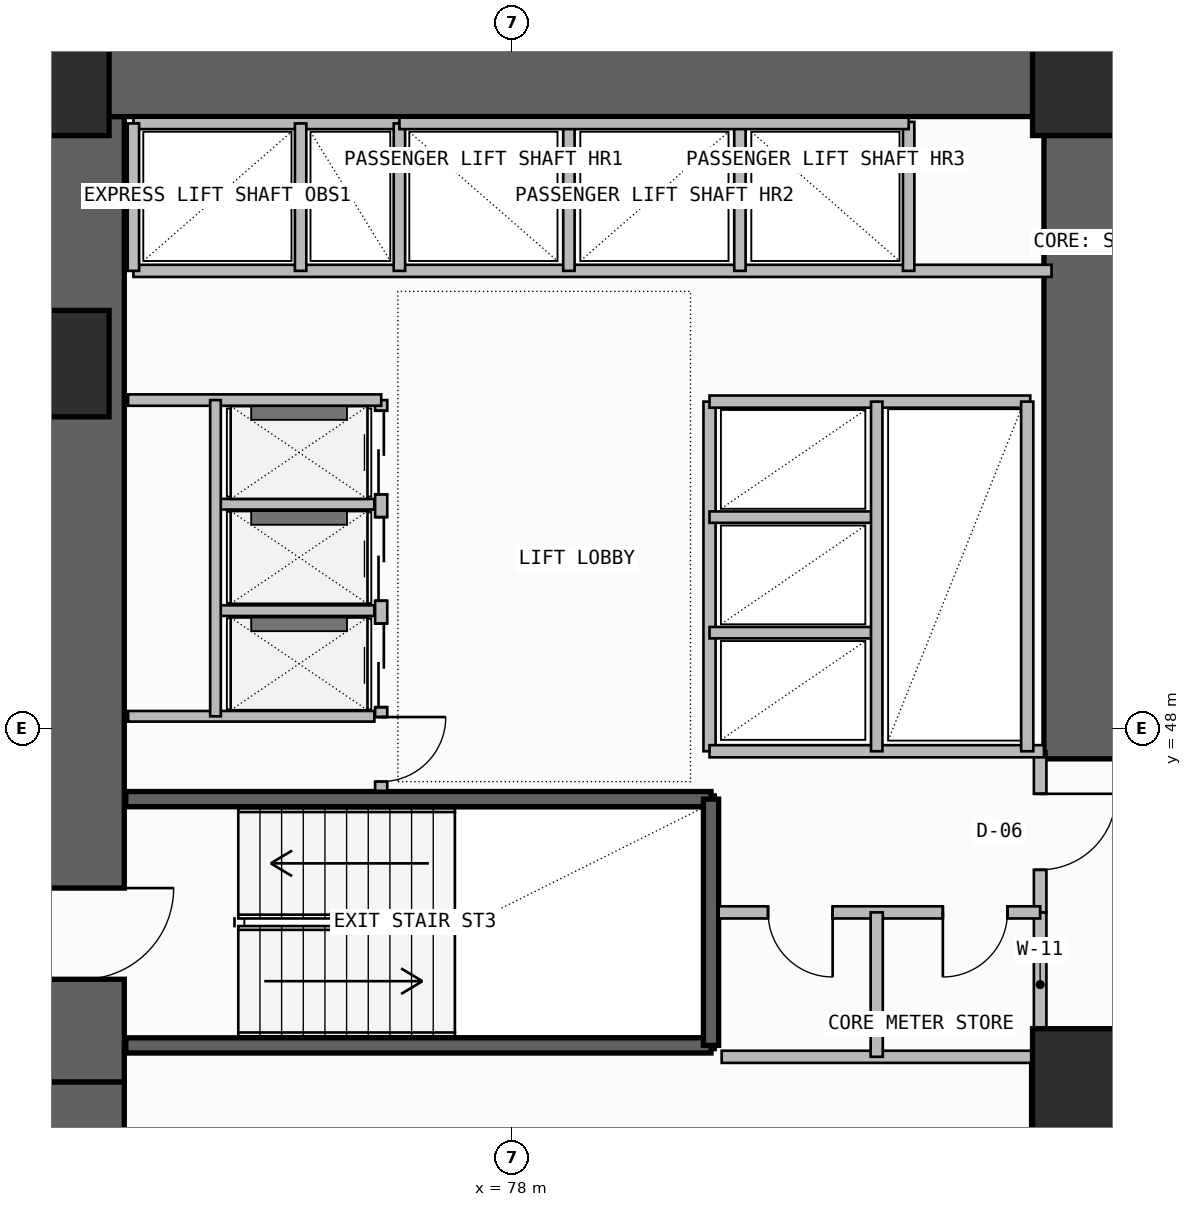
"""IFC4 building model, lengths in metres.
Left out: names, types, materials, properties, quantities, classifications, styles, units other than length and angle.
Written with IfcOpenShell. Run it as: python <this file> out.ifc"""

import sys

from ifc_helpers import new_model, si_unit, direction, frame, frame_2d, origin, origin_2d, place, context, subcontext, project, spatial, rectangle, extrude, element, fill, save


model = new_model("IFC4")
c1 = context("Model", 3, precision=1e-05, world=origin(), true_north=direction((0.0, 1.0)))
c2 = subcontext(c1, "Body", "Model", "MODEL_VIEW")
j1 = project(units=[si_unit("LENGTHUNIT", "METRE"), si_unit("PLANEANGLEUNIT", "RADIAN")], contexts=[c1])
p1 = place(None, origin())
s1 = spatial("IfcSite", under=j1, at=p1, CompositionType="ELEMENT")
p2 = place(p1, origin())
s2 = spatial("IfcBuilding", under=s1, at=p2, CompositionType="ELEMENT")
p3 = place(p2, frame((0.0, 0.0, 77.7)))
s3 = spatial("IfcBuildingStorey", under=s2, at=p3, CompositionType="ELEMENT", Elevation=77.7)
p4 = place(p3, frame((72.35, 35.5, -0.26), z_axis=(0.0, 0.0, 1.0), x_axis=(0.0, 1.0, 0.0)))
e1 = element("IfcWall", 1, at=p4, inside=s3, PredefinedType="SHEAR", context=c2, shape_type="SweptSolid", body=[
    extrude(rectangle(XDim=7.85, YDim=1.1, at=frame_2d((3.925, 0.0))), origin(), (0.0, 0.0, 1.0), 3.6),
])
p5 = place(p4, frame((1.45, 0.0, 0.26)))
e2 = element("IfcOpeningElement", 2, at=p5, cuts=e1, PredefinedType="OPENING", context=c2, shape_type="SweptSolid", body=[
    extrude(rectangle(XDim=1.2, YDim=2.2, at=frame_2d((0.6, 1.1))), frame((0.0, 0.56, 0.0), z_axis=(0.0, -1.0, 0.0), x_axis=(1.0, 0.0, 0.0)), (0.0, 0.0, 1.0), 1.12),
])
p6 = place(p3, frame((72.35, 43.35, -0.26), z_axis=(0.0, 0.0, 1.0), x_axis=(0.0, 1.0, 0.0)))
e3 = element("IfcWall", 3, at=p6, inside=s3, PredefinedType="SHEAR", context=c2, shape_type="SweptSolid", body=[
    extrude(rectangle(XDim=12.7, YDim=1.1, at=frame_2d((6.35, 0.0))), origin(), (0.0, 0.0, 1.0), 3.6),
])
p7 = place(p6, frame((1.35, 0.0, 0.26)))
e4 = element("IfcOpeningElement", 4, at=p7, cuts=e3, PredefinedType="OPENING", context=c2, shape_type="SweptSolid", body=[
    extrude(rectangle(XDim=1.2, YDim=2.2, at=frame_2d((0.6, 1.1))), frame((0.0, 0.56, 0.0), z_axis=(0.0, -1.0, 0.0), x_axis=(1.0, 0.0, 0.0)), (0.0, 0.0, 1.0), 1.12),
])
p8 = place(p3, frame((71.8, 56.6, -0.26), z_axis=(0.0, 0.0, 1.0), x_axis=(1.0, 0.0, 0.0)))
e5 = element("IfcWall", 5, at=p8, inside=s3, PredefinedType="SHEAR", context=c2, shape_type="SweptSolid", body=[
    extrude(rectangle(XDim=14.3, YDim=1.1, at=frame_2d((7.15, 0.0))), origin(), (0.0, 0.0, 1.0), 3.6),
])
p9 = place(p3, frame((85.55, 47.6, -0.26), z_axis=(0.0, 0.0, 1.0), x_axis=(0.0, 1.0, 0.0)))
e6 = element("IfcWall", 6, at=p9, inside=s3, PredefinedType="SHEAR", context=c2, shape_type="SweptSolid", body=[
    extrude(rectangle(XDim=8.45, YDim=1.1, at=frame_2d((4.225, 0.0))), origin(), (0.0, 0.0, 1.0), 3.6),
])
for number, where, z_axis, x_axis in (
    (7, (85.55, 43.35, 0.0), (0.0, 0.0, 1.0), (1.0, 0.0, 0.0)),
    (8, (72.0, 52.8, 0.0), (0.0, 0.0, 1.0), (1.0, 0.0, 0.0)),
    (9, (72.0, 56.5, 0.0), (0.0, 0.0, 1.0), (1.0, 0.0, 0.0)),
    (10, (85.55, 56.5, 0.0), (0.0, 0.0, 1.0), (1.0, 0.0, 0.0)),
):
    element("IfcColumn", number, at=place(p3, frame(where, z_axis=z_axis, x_axis=x_axis)), inside=s3, PredefinedType="COLUMN", context=c2, shape_type="SweptSolid", body=[
        extrude(rectangle(XDim=1.4, YDim=1.4, at=origin_2d()), origin(), (0.0, 0.0, 1.0), 3.6),
    ])
p10 = place(p3, frame((84.92, 38.85, 0.0), z_axis=(0.0, 0.0, 1.0), x_axis=(0.0, 1.0, 0.0)))
e11 = element("IfcWall", 11, at=p10, inside=s3, PredefinedType="SOLIDWALL", context=c2, shape_type="SweptSolid", body=[
    extrude(rectangle(XDim=4.83, YDim=0.2, at=frame_2d((2.415, 0.0))), origin(), (0.0, 0.0, 1.0), 3.34),
])
p11 = place(p10, frame((1.25, 0.0, 0.0)))
e12 = element("IfcOpeningElement", 12, at=p11, cuts=e11, PredefinedType="OPENING", context=c2, shape_type="SweptSolid", body=[
    extrude(rectangle(XDim=1.1, YDim=2.2, at=frame_2d((0.55, 1.1))), frame((0.0, 0.11, 0.0), z_axis=(0.0, -1.0, 0.0), x_axis=(1.0, 0.0, 0.0)), (0.0, 0.0, 1.0), 0.22),
])
for number, where, z_axis, x_axis in (
    (13, (72.92, 43.83, -0.26), (0.0, 0.0, 1.0), (1.0, 0.0, 0.0)),
    (14, (72.92, 47.07, -0.26), (0.0, 0.0, 1.0), (1.0, 0.0, 0.0)),
):
    element("IfcWall", number, at=place(p3, frame(where, z_axis=z_axis, x_axis=x_axis)), inside=s3, PredefinedType="SOLIDWALL", context=c2, shape_type="SweptSolid", body=[
        extrude(rectangle(XDim=7.7, YDim=0.2, at=frame_2d((3.85, 0.0))), origin(), (0.0, 0.0, 1.0), 3.6),
    ])
p12 = place(p3, frame((80.62, 43.83, -0.26), z_axis=(0.0, 0.0, 1.0), x_axis=(0.0, 1.0, 0.0)))
e15 = element("IfcWall", 15, at=p12, inside=s3, PredefinedType="SOLIDWALL", context=c2, shape_type="SweptSolid", body=[
    extrude(rectangle(XDim=3.24, YDim=0.2, at=frame_2d((1.62, 0.0))), origin(), (0.0, 0.0, 1.0), 3.6),
])
p13 = place(p3, frame((84.95, 43.68, 0.0), z_axis=(0.0, 0.0, 1.0), x_axis=(0.0, 1.0, 0.0)))
e16 = element("IfcWall", 16, at=p13, inside=s3, PredefinedType="PLUMBINGWALL", context=c2, shape_type="SweptSolid", body=[
    extrude(rectangle(XDim=1.9, YDim=0.165, at=frame_2d((0.95, 0.0))), origin(), (0.0, 0.0, 1.0), 3.34),
])
p14 = place(p3, frame((84.95, 45.58, 0.0), z_axis=(0.0, 0.0, 1.0), x_axis=(0.0, 1.0, 0.0)))
e17 = element("IfcWall", 17, at=p14, inside=s3, PredefinedType="PARTITIONING", context=c2, shape_type="SweptSolid", body=[
    extrude(rectangle(XDim=2.12, YDim=0.165, at=frame_2d((1.06, 0.0))), origin(), (0.0, 0.0, 1.0), 3.34),
])
p15 = place(p14, frame((0.56, 0.0, 0.0)))
e18 = element("IfcOpeningElement", 18, at=p15, cuts=e17, PredefinedType="OPENING", context=c2, shape_type="SweptSolid", body=[
    extrude(rectangle(XDim=1.0, YDim=2.2, at=frame_2d((0.5, 1.1))), frame((0.0, 0.093, 0.0), z_axis=(0.0, -1.0, 0.0), x_axis=(1.0, 0.0, 0.0)), (0.0, 0.0, 1.0), 0.185),
])
p16 = place(p3, frame((80.72, 45.58, 0.0), z_axis=(0.0, 0.0, 1.0), x_axis=(1.0, 0.0, 0.0)))
e19 = element("IfcWall", 19, at=p16, inside=s3, PredefinedType="PLUMBINGWALL", context=c2, shape_type="SweptSolid", body=[
    extrude(rectangle(XDim=4.23, YDim=0.16, at=frame_2d((2.115, 0.0))), origin(), (0.0, 0.0, 1.0), 3.34),
])
p17 = place(p16, frame((0.65, 0.0, 0.0)))
e20 = element("IfcOpeningElement", 20, at=p17, cuts=e19, PredefinedType="OPENING", context=c2, shape_type="SweptSolid", body=[
    extrude(rectangle(XDim=0.85, YDim=2.05, at=frame_2d((0.425, 1.025))), frame((0.0, 0.09, 0.0), z_axis=(0.0, -1.0, 0.0), x_axis=(1.0, 0.0, 0.0)), (0.0, 0.0, 1.0), 0.18),
])
p18 = place(p16, frame((2.95, 0.0, 0.0)))
e21 = element("IfcOpeningElement", 21, at=p18, cuts=e19, PredefinedType="OPENING", context=c2, shape_type="SweptSolid", body=[
    extrude(rectangle(XDim=0.85, YDim=2.05, at=frame_2d((0.425, 1.025))), frame((0.0, 0.09, 0.0), z_axis=(0.0, -1.0, 0.0), x_axis=(1.0, 0.0, 0.0)), (0.0, 0.0, 1.0), 0.18),
])
p19 = place(p3, frame((80.76, 43.68, 0.0), z_axis=(0.0, 0.0, 1.0), x_axis=(1.0, 0.0, 0.0)))
e22 = element("IfcWall", 22, at=p19, inside=s3, PredefinedType="PLUMBINGWALL", context=c2, shape_type="SweptSolid", body=[
    extrude(rectangle(XDim=4.19, YDim=0.16, at=frame_2d((2.095, 0.0))), origin(), (0.0, 0.0, 1.0), 3.34),
])
p20 = place(p3, frame((82.8, 43.68, 0.0), z_axis=(0.0, 0.0, 1.0), x_axis=(0.0, 1.0, 0.0)))
e23 = element("IfcWall", 23, at=p20, inside=s3, PredefinedType="PLUMBINGWALL", context=c2, shape_type="SweptSolid", body=[
    extrude(rectangle(XDim=1.9, YDim=0.16, at=frame_2d((0.95, 0.0))), origin(), (0.0, 0.0, 1.0), 3.34),
])
p21 = place(p3, frame((76.28, 47.18, 0.0), z_axis=(0.0, 0.0, 1.0), x_axis=(0.0, 1.0, 0.0)))
e24 = element("IfcWall", 24, at=p21, inside=s3, PredefinedType="SOLIDWALL", context=c2, shape_type="SweptSolid", body=[
    extrude(rectangle(XDim=5.14, YDim=0.16, at=frame_2d((2.57, 0.0))), origin(), (0.0, 0.0, 1.0), 3.34),
])
p22 = place(p21, frame((1.1, 0.0, 0.0)))
e25 = element("IfcOpeningElement", 25, at=p22, cuts=e24, PredefinedType="OPENING", context=c2, shape_type="SweptSolid", body=[
    extrude(rectangle(XDim=1.1, YDim=2.25, at=frame_2d((0.55, 1.125))), frame((0.0, 0.09, 0.0), z_axis=(0.0, -1.0, 0.0), x_axis=(1.0, 0.0, 0.0)), (0.0, 0.0, 1.0), 0.18),
])
p23 = place(p21, frame((2.5, 0.0, 0.0)))
e26 = element("IfcOpeningElement", 26, at=p23, cuts=e24, PredefinedType="OPENING", context=c2, shape_type="SweptSolid", body=[
    extrude(rectangle(XDim=1.1, YDim=2.25, at=frame_2d((0.55, 1.125))), frame((0.0, 0.09, 0.0), z_axis=(0.0, -1.0, 0.0), x_axis=(1.0, 0.0, 0.0)), (0.0, 0.0, 1.0), 0.18),
])
p24 = place(p21, frame((3.9, 0.0, 0.0)))
e27 = element("IfcOpeningElement", 27, at=p24, cuts=e24, PredefinedType="OPENING", context=c2, shape_type="SweptSolid", body=[
    extrude(rectangle(XDim=1.1, YDim=2.25, at=frame_2d((0.55, 1.125))), frame((0.0, 0.09, 0.0), z_axis=(0.0, -1.0, 0.0), x_axis=(1.0, 0.0, 0.0)), (0.0, 0.0, 1.0), 0.18),
])
p25 = place(p21, frame((0.12, 0.0, 0.0)))
e28 = element("IfcOpeningElement", 28, at=p25, cuts=e24, PredefinedType="OPENING", context=c2, shape_type="SweptSolid", body=[
    extrude(rectangle(XDim=0.85, YDim=2.05, at=frame_2d((0.425, 1.025))), frame((0.0, 0.09, 0.0), z_axis=(0.0, -1.0, 0.0), x_axis=(1.0, 0.0, 0.0)), (0.0, 0.0, 1.0), 0.18),
])
p26 = place(p3, frame((72.95, 52.32, 0.0), z_axis=(0.0, 0.0, 1.0), x_axis=(1.0, 0.0, 0.0)))
e29 = element("IfcWall", 29, at=p26, inside=s3, PredefinedType="SOLIDWALL", context=c2, shape_type="SweptSolid", body=[
    extrude(rectangle(XDim=3.33, YDim=0.15, at=frame_2d((1.665, 0.0))), origin(), (0.0, 0.0, 1.0), 3.34),
])
p27 = place(p3, frame((72.95, 48.16, 0.0), z_axis=(0.0, 0.0, 1.0), x_axis=(1.0, 0.0, 0.0)))
e30 = element("IfcWall", 30, at=p27, inside=s3, PredefinedType="PLUMBINGWALL", context=c2, shape_type="SweptSolid", body=[
    extrude(rectangle(XDim=3.24, YDim=0.14, at=frame_2d((1.62, 0.0))), origin(), (0.0, 0.0, 1.0), 3.34),
])
for number, where, z_axis, x_axis in (
    (31, (74.15, 49.55, 0.0), (0.0, 0.0, 1.0), (1.0, 0.0, 0.0)),
    (32, (74.15, 50.95, 0.0), (0.0, 0.0, 1.0), (1.0, 0.0, 0.0)),
):
    element("IfcWall", number, at=place(p3, frame(where, z_axis=z_axis, x_axis=x_axis)), inside=s3, PredefinedType="PLUMBINGWALL", context=c2, shape_type="SweptSolid", body=[
        extrude(rectangle(XDim=2.04, YDim=0.14, at=frame_2d((1.02, 0.0))), origin(), (0.0, 0.0, 1.0), 3.34),
    ])
p28 = place(p3, frame((74.1, 48.16, 0.0), z_axis=(0.0, 0.0, 1.0), x_axis=(0.0, 1.0, 0.0)))
e33 = element("IfcWall", 33, at=p28, inside=s3, PredefinedType="PLUMBINGWALL", context=c2, shape_type="SweptSolid", body=[
    extrude(rectangle(XDim=4.16, YDim=0.14, at=frame_2d((2.08, 0.0))), origin(), (0.0, 0.0, 1.0), 3.34),
])
p29 = place(p3, frame((80.6, 47.7, 0.0), z_axis=(0.0, 0.0, 1.0), x_axis=(0.0, 1.0, 0.0)))
e34 = element("IfcWall", 34, at=p29, inside=s3, PredefinedType="SOLIDWALL", context=c2, shape_type="SweptSolid", body=[
    extrude(rectangle(XDim=4.6, YDim=0.16, at=frame_2d((2.3, 0.0))), origin(), (0.0, 0.0, 1.0), 3.34),
])
p30 = place(p3, frame((80.6, 47.7, 0.0), z_axis=(0.0, 0.0, 1.0), x_axis=(1.0, 0.0, 0.0)))
e35 = element("IfcWall", 35, at=p30, inside=s3, PredefinedType="SOLIDWALL", context=c2, shape_type="SweptSolid", body=[
    extrude(rectangle(XDim=4.4, YDim=0.16, at=frame_2d((2.2, 0.0))), origin(), (0.0, 0.0, 1.0), 3.34),
])
p31 = place(p3, frame((80.6, 52.3, 0.0), z_axis=(0.0, 0.0, 1.0), x_axis=(1.0, 0.0, 0.0)))
e36 = element("IfcWall", 36, at=p31, inside=s3, PredefinedType="SOLIDWALL", context=c2, shape_type="SweptSolid", body=[
    extrude(rectangle(XDim=4.22, YDim=0.16, at=frame_2d((2.11, 0.0))), origin(), (0.0, 0.0, 1.0), 3.34),
])
for number, where, z_axis, x_axis in (
    (37, (80.6, 49.26, 0.0), (0.0, 0.0, 1.0), (1.0, 0.0, 0.0)),
    (38, (80.6, 50.78, 0.0), (0.0, 0.0, 1.0), (1.0, 0.0, 0.0)),
):
    element("IfcWall", number, at=place(p3, frame(where, z_axis=z_axis, x_axis=x_axis)), inside=s3, PredefinedType="PLUMBINGWALL", context=c2, shape_type="SweptSolid", body=[
        extrude(rectangle(XDim=2.2, YDim=0.15, at=frame_2d((1.1, 0.0))), origin(), (0.0, 0.0, 1.0), 3.34),
    ])
p32 = place(p3, frame((82.8, 47.7, 0.0), z_axis=(0.0, 0.0, 1.0), x_axis=(0.0, 1.0, 0.0)))
e39 = element("IfcWall", 39, at=p32, inside=s3, PredefinedType="PLUMBINGWALL", context=c2, shape_type="SweptSolid", body=[
    extrude(rectangle(XDim=4.6, YDim=0.15, at=frame_2d((2.3, 0.0))), origin(), (0.0, 0.0, 1.0), 3.34),
])
p33 = place(p3, frame((84.78, 47.7, 0.0), z_axis=(0.0, 0.0, 1.0), x_axis=(0.0, 1.0, 0.0)))
e40 = element("IfcWall", 40, at=p33, inside=s3, PredefinedType="SOLIDWALL", context=c2, shape_type="SweptSolid", body=[
    extrude(rectangle(XDim=4.6, YDim=0.16, at=frame_2d((2.3, 0.0))), origin(), (0.0, 0.0, 1.0), 3.34),
])
p34 = place(p3, frame((73.02, 54.02, 0.0), z_axis=(0.0, 0.0, 1.0), x_axis=(1.0, 0.0, 0.0)))
e41 = element("IfcWall", 41, at=p34, inside=s3, PredefinedType="SOLIDWALL", context=c2, shape_type="SweptSolid", body=[
    extrude(rectangle(XDim=12.08, YDim=0.16, at=frame_2d((6.04, 0.0))), origin(), (0.0, 0.0, 1.0), 3.34),
])
p35 = place(p3, frame((73.02, 55.96, 0.0), z_axis=(0.0, 0.0, 1.0), x_axis=(1.0, 0.0, 0.0)))
e42 = element("IfcWall", 42, at=p35, inside=s3, PredefinedType="SOLIDWALL", context=c2, shape_type="SweptSolid", body=[
    extrude(rectangle(XDim=3.5, YDim=0.15, at=frame_2d((1.75, 0.0))), origin(), (0.0, 0.0, 1.0), 3.34),
])
p36 = place(p3, frame((73.02, 54.02, 0.0), z_axis=(0.0, 0.0, 1.0), x_axis=(0.0, 1.0, 0.0)))
e43 = element("IfcWall", 43, at=p36, inside=s3, PredefinedType="PLUMBINGWALL", context=c2, shape_type="SweptSolid", body=[
    extrude(rectangle(XDim=1.94, YDim=0.15, at=frame_2d((0.97, 0.0))), origin(), (0.0, 0.0, 1.0), 3.34),
])
p37 = place(p3, frame((76.52, 54.02, 0.0), z_axis=(0.0, 0.0, 1.0), x_axis=(0.0, 1.0, 0.0)))
e44 = element("IfcWall", 44, at=p37, inside=s3, PredefinedType="SOLIDWALL", context=c2, shape_type="SweptSolid", body=[
    extrude(rectangle(XDim=1.94, YDim=0.15, at=frame_2d((0.97, 0.0))), origin(), (0.0, 0.0, 1.0), 3.34),
])
p38 = place(p3, frame((75.22, 54.02, 0.0), z_axis=(0.0, 0.0, 1.0), x_axis=(0.0, 1.0, 0.0)))
e45 = element("IfcWall", 45, at=p38, inside=s3, PredefinedType="PLUMBINGWALL", context=c2, shape_type="SweptSolid", body=[
    extrude(rectangle(XDim=1.94, YDim=0.15, at=frame_2d((0.97, 0.0))), origin(), (0.0, 0.0, 1.0), 3.34),
])
for number, where, z_axis, x_axis in (
    (46, (78.75, 54.02, 0.0), (0.0, 0.0, 1.0), (0.0, 1.0, 0.0)),
    (47, (81.0, 54.02, 0.0), (0.0, 0.0, 1.0), (0.0, 1.0, 0.0)),
):
    element("IfcWall", number, at=place(p3, frame(where, z_axis=z_axis, x_axis=x_axis)), inside=s3, PredefinedType="PLUMBINGWALL", context=c2, shape_type="SweptSolid", body=[
        extrude(rectangle(XDim=1.96, YDim=0.15, at=frame_2d((0.98, 0.0))), origin(), (0.0, 0.0, 1.0), 3.34),
    ])
p39 = place(p3, frame((83.22, 54.02, 0.0), z_axis=(0.0, 0.0, 1.0), x_axis=(0.0, 1.0, 0.0)))
e48 = element("IfcWall", 48, at=p39, inside=s3, PredefinedType="SOLIDWALL", context=c2, shape_type="SweptSolid", body=[
    extrude(rectangle(XDim=1.96, YDim=0.15, at=frame_2d((0.98, 0.0))), origin(), (0.0, 0.0, 1.0), 3.34),
])
p40 = place(p3, frame((76.52, 55.96, 0.0), z_axis=(0.0, 0.0, 1.0), x_axis=(1.0, 0.0, 0.0)))
e49 = element("IfcWall", 49, at=p40, inside=s3, PredefinedType="SOLIDWALL", context=c2, shape_type="SweptSolid", body=[
    extrude(rectangle(XDim=6.7, YDim=0.15, at=frame_2d((3.35, 0.0))), origin(), (0.0, 0.0, 1.0), 3.34),
])
p41 = place(p7, frame((1.2, 0.0, 0.0), z_axis=(0.0, 0.0, 1.0), x_axis=(-1.0, 0.0, 0.0)))
e50 = element("IfcDoor", 50, at=p41, inside=s3, OperationType="SINGLE_SWING_LEFT", PredefinedType="USERDEFINED", context=c2, shape_type="SweptSolid", body=[
    extrude(rectangle(XDim=1.2, YDim=2.2, at=frame_2d((0.6, 1.1))), frame((0.0, 0.025, 0.0), z_axis=(0.0, -1.0, 0.0), x_axis=(1.0, 0.0, 0.0)), (0.0, 0.0, 1.0), 0.05),
])
fill(e4, e50)
p42 = place(p15, frame((1.0, 0.0, 0.0), z_axis=(0.0, 0.0, 1.0), x_axis=(-1.0, 0.0, 0.0)))
e51 = element("IfcDoor", 51, at=p42, inside=s3, OperationType="SINGLE_SWING_LEFT", PredefinedType="DOOR", context=c2, shape_type="SweptSolid", body=[
    extrude(rectangle(XDim=1.0, YDim=2.2, at=frame_2d((0.5, 1.1))), frame((0.0, 0.025, 0.0), z_axis=(0.0, -1.0, 0.0), x_axis=(1.0, 0.0, 0.0)), (0.0, 0.0, 1.0), 0.05),
])
fill(e18, e51)
p43 = place(p17, frame((0.85, 0.0, 0.0), z_axis=(0.0, 0.0, 1.0), x_axis=(-1.0, 0.0, 0.0)))
e52 = element("IfcDoor", 52, at=p43, inside=s3, OperationType="SINGLE_SWING_LEFT", PredefinedType="DOOR", context=c2, shape_type="SweptSolid", body=[
    extrude(rectangle(XDim=0.85, YDim=2.05, at=frame_2d((0.425, 1.025))), frame((0.0, 0.025, 0.0), z_axis=(0.0, -1.0, 0.0), x_axis=(1.0, 0.0, 0.0)), (0.0, 0.0, 1.0), 0.05),
])
fill(e20, e52)
p44 = place(p18, frame((0.85, 0.0, 0.0), z_axis=(0.0, 0.0, 1.0), x_axis=(-1.0, 0.0, 0.0)))
e53 = element("IfcDoor", 53, at=p44, inside=s3, OperationType="SINGLE_SWING_RIGHT", PredefinedType="DOOR", context=c2, shape_type="SweptSolid", body=[
    extrude(rectangle(XDim=0.85, YDim=2.05, at=frame_2d((0.425, 1.025))), frame((0.0, 0.025, 0.0), z_axis=(0.0, -1.0, 0.0), x_axis=(1.0, 0.0, 0.0)), (0.0, 0.0, 1.0), 0.05),
])
fill(e21, e53)
p45 = place(p22, origin())
e54 = element("IfcDoor", 54, at=p45, inside=s3, OperationType="DOUBLE_DOOR_SLIDING", PredefinedType="DOOR", context=c2, shape_type="SweptSolid", body=[
    extrude(rectangle(XDim=1.1, YDim=2.25, at=frame_2d((0.55, 1.125))), frame((0.0, 0.025, 0.0), z_axis=(0.0, -1.0, 0.0), x_axis=(1.0, 0.0, 0.0)), (0.0, 0.0, 1.0), 0.05),
])
fill(e25, e54)
p46 = place(p23, origin())
e55 = element("IfcDoor", 55, at=p46, inside=s3, OperationType="DOUBLE_DOOR_SLIDING", PredefinedType="DOOR", context=c2, shape_type="SweptSolid", body=[
    extrude(rectangle(XDim=1.1, YDim=2.25, at=frame_2d((0.55, 1.125))), frame((0.0, 0.025, 0.0), z_axis=(0.0, -1.0, 0.0), x_axis=(1.0, 0.0, 0.0)), (0.0, 0.0, 1.0), 0.05),
])
fill(e26, e55)
p47 = place(p24, origin())
e56 = element("IfcDoor", 56, at=p47, inside=s3, OperationType="DOUBLE_DOOR_SLIDING", PredefinedType="DOOR", context=c2, shape_type="SweptSolid", body=[
    extrude(rectangle(XDim=1.1, YDim=2.25, at=frame_2d((0.55, 1.125))), frame((0.0, 0.025, 0.0), z_axis=(0.0, -1.0, 0.0), x_axis=(1.0, 0.0, 0.0)), (0.0, 0.0, 1.0), 0.05),
])
fill(e27, e56)
p48 = place(p25, frame((0.85, 0.0, 0.0), z_axis=(0.0, 0.0, 1.0), x_axis=(-1.0, 0.0, 0.0)))
e57 = element("IfcDoor", 57, at=p48, inside=s3, OperationType="SINGLE_SWING_LEFT", PredefinedType="DOOR", context=c2, shape_type="SweptSolid", body=[
    extrude(rectangle(XDim=0.85, YDim=2.05, at=frame_2d((0.425, 1.025))), frame((0.0, 0.025, 0.0), z_axis=(0.0, -1.0, 0.0), x_axis=(1.0, 0.0, 0.0)), (0.0, 0.0, 1.0), 0.05),
])
fill(e28, e57)
save(model, sys.argv[1])
